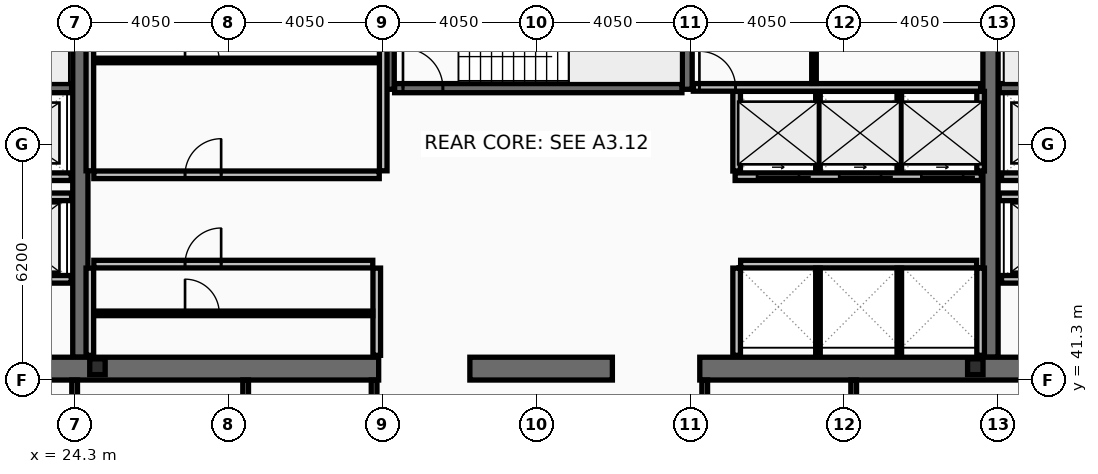
"""IFC4 building model, lengths in metres.
Left out: names, types, materials, properties, quantities, classifications, styles, units other than length and angle.
Written with IfcOpenShell. Run it as: python <this file> out.ifc"""

import sys

from ifc_helpers import new_model, si_unit, direction, frame, frame_2d, origin, origin_2d, place, context, subcontext, project, spatial, rectangle, i_section, extrude, element, fill, save


model = new_model("IFC4")
c1 = context("Model", 3, precision=1e-05, world=origin(), true_north=direction((0.0, 1.0)))
c2 = subcontext(c1, "Body", "Model", "MODEL_VIEW")
j1 = project(units=[si_unit("LENGTHUNIT", "METRE"), si_unit("PLANEANGLEUNIT", "RADIAN")], contexts=[c1])
p1 = place(None, origin())
s1 = spatial("IfcSite", under=j1, at=p1, CompositionType="ELEMENT")
p2 = place(p1, origin())
s2 = spatial("IfcBuilding", under=s1, at=p2, CompositionType="ELEMENT")
p3 = place(p2, frame((0.0, 0.0, 195.8)))
s3 = spatial("IfcBuildingStorey", under=s2, at=p3, CompositionType="ELEMENT", Elevation=195.8)
for number, where, z_axis, x_axis in (
    (1, (24.45, 41.9, 0.0), (0.0, 0.0, 1.0), (0.0, 1.0, 0.0)),
    (2, (48.4, 41.9, 0.0), (0.0, 0.0, 1.0), (0.0, 1.0, 0.0)),
):
    element("IfcWall", number, at=place(p3, frame(where, z_axis=z_axis, x_axis=x_axis)), inside=s3, PredefinedType="SHEAR", context=c2, shape_type="SweptSolid", body=[
        extrude(rectangle(XDim=11.2, YDim=0.4, at=frame_2d((5.6, 0.0))), origin(), (0.0, 0.0, 1.0), 3.44),
    ])
p4 = place(p3, frame((32.3, 41.6, 0.0), z_axis=(0.0, 0.0, 1.0), x_axis=(-1.0, 0.0, 0.0)))
e3 = element("IfcWall", 3, at=p4, inside=s3, PredefinedType="SHEAR", context=c2, shape_type="SweptSolid", body=[
    extrude(rectangle(XDim=11.45, YDim=0.6, at=frame_2d((5.725, 0.0))), origin(), (0.0, 0.0, 1.0), 3.44),
])
p5 = place(p3, frame((38.45, 41.6, 0.0), z_axis=(0.0, 0.0, 1.0), x_axis=(-1.0, 0.0, 0.0)))
e4 = element("IfcWall", 4, at=p5, inside=s3, PredefinedType="SHEAR", context=c2, shape_type="SweptSolid", body=[
    extrude(rectangle(XDim=3.75, YDim=0.6, at=frame_2d((1.875, 0.0))), origin(), (0.0, 0.0, 1.0), 3.44),
])
p6 = place(p3, frame((52.05, 41.6, 0.0), z_axis=(0.0, 0.0, 1.0), x_axis=(-1.0, 0.0, 0.0)))
e5 = element("IfcWall", 5, at=p6, inside=s3, PredefinedType="SHEAR", context=c2, shape_type="SweptSolid", body=[
    extrude(rectangle(XDim=11.3, YDim=0.6, at=frame_2d((5.65, 0.0))), origin(), (0.0, 0.0, 1.0), 3.44),
])
for number, where, z_axis, x_axis in (
    (6, (32.58, 48.95, 0.0), (0.0, 0.0, 1.0), (0.0, 1.0, 0.0)),
    (7, (40.42, 48.95, 0.0), (0.0, 0.0, 1.0), (0.0, 1.0, 0.0)),
):
    element("IfcWall", number, at=place(p3, frame(where, z_axis=z_axis, x_axis=x_axis)), inside=s3, PredefinedType="SHEAR", context=c2, shape_type="SweptSolid", body=[
        extrude(rectangle(XDim=4.15, YDim=0.26, at=frame_2d((2.075, 0.0))), origin(), (0.0, 0.0, 1.0), 3.44),
    ])
p7 = place(p3, frame((16.8, 48.98, 0.0), z_axis=(0.0, 0.0, 1.0), x_axis=(1.0, 0.0, 0.0)))
e8 = element("IfcWall", 8, at=p7, inside=s3, PredefinedType="SHEAR", context=c2, shape_type="SweptSolid", body=[
    extrude(rectangle(XDim=7.42, YDim=0.24, at=frame_2d((3.71, 0.0))), origin(), (0.0, 0.0, 1.0), 3.44),
])
p8 = place(p7, frame((0.22, 0.0, 0.0)))
e9 = element("IfcOpeningElement", 9, at=p8, cuts=e8, PredefinedType="OPENING", context=c2, shape_type="SweptSolid", body=[
    extrude(rectangle(XDim=1.05, YDim=2.15, at=frame_2d((0.525, 1.075))), frame((0.0, 0.13, 0.0), z_axis=(0.0, -1.0, 0.0), x_axis=(1.0, 0.0, 0.0)), (0.0, 0.0, 1.0), 0.26),
])
p9 = place(p3, frame((48.63, 48.98, 0.0), z_axis=(0.0, 0.0, 1.0), x_axis=(1.0, 0.0, 0.0)))
e10 = element("IfcWall", 10, at=p9, inside=s3, PredefinedType="SHEAR", context=c2, shape_type="SweptSolid", body=[
    extrude(rectangle(XDim=7.47, YDim=0.24, at=frame_2d((3.735, 0.0))), origin(), (0.0, 0.0, 1.0), 3.44),
])
p10 = place(p9, frame((6.2, 0.0, 0.0)))
e11 = element("IfcOpeningElement", 11, at=p10, cuts=e10, PredefinedType="OPENING", context=c2, shape_type="SweptSolid", body=[
    extrude(rectangle(XDim=1.05, YDim=2.15, at=frame_2d((0.525, 1.075))), frame((0.0, 0.13, 0.0), z_axis=(0.0, -1.0, 0.0), x_axis=(1.0, 0.0, 0.0)), (0.0, 0.0, 1.0), 0.26),
])
p11 = place(p3, frame((32.72, 48.98, 0.0), z_axis=(0.0, 0.0, 1.0), x_axis=(1.0, 0.0, 0.0)))
e12 = element("IfcWall", 12, at=p11, inside=s3, PredefinedType="SHEAR", context=c2, shape_type="SweptSolid", body=[
    extrude(rectangle(XDim=7.56, YDim=0.24, at=frame_2d((3.78, 0.0))), origin(), (0.0, 0.0, 1.0), 3.44),
])
p12 = place(p11, frame((0.22, 0.0, 0.0)))
e13 = element("IfcOpeningElement", 13, at=p12, cuts=e12, PredefinedType="OPENING", context=c2, shape_type="SweptSolid", body=[
    extrude(rectangle(XDim=1.05, YDim=2.15, at=frame_2d((0.525, 1.075))), frame((0.0, 0.13, 0.0), z_axis=(0.0, -1.0, 0.0), x_axis=(1.0, 0.0, 0.0)), (0.0, 0.0, 1.0), 0.26),
])
for number, where, z_axis, x_axis in (
    (14, (24.9, 41.65, 0.0), (0.0, 0.0, 1.0), (1.0, 0.0, 0.0)),
    (15, (48.0, 41.65, 0.0), (0.0, 0.0, 1.0), (1.0, 0.0, 0.0)),
):
    element("IfcColumn", number, at=place(p3, frame(where, z_axis=z_axis, x_axis=x_axis)), inside=s3, PredefinedType="COLUMN", context=c2, shape_type="SweptSolid", body=[
        extrude(i_section(OverallWidth=0.406, OverallDepth=0.416, WebThickness=0.03, FlangeThickness=0.048, at=origin_2d()), origin(), (0.0, 0.0, 1.0), 3.6),
    ])
p13 = place(p3, frame((51.61, 43.95, 0.0), z_axis=(0.0, 0.0, 1.0), x_axis=(-1.0, 0.0, 0.0)))
e16 = element("IfcWall", 16, at=p13, inside=s3, PredefinedType="PARTITIONING", context=c2, shape_type="SweptSolid", body=[
    extrude(rectangle(XDim=2.92, YDim=0.2, at=frame_2d((1.46, 0.0))), origin(), (0.0, 0.0, 1.0), 3.44),
])
p14 = place(p13, frame((0.81, 0.0, 0.0)))
e17 = element("IfcOpeningElement", 17, at=p14, cuts=e16, PredefinedType="OPENING", context=c2, shape_type="SweptSolid", body=[
    extrude(rectangle(XDim=1.3, YDim=2.18, at=frame_2d((0.65, 1.09))), frame((0.0, 0.11, 0.0), z_axis=(0.0, -1.0, 0.0), x_axis=(1.0, 0.0, 0.0)), (0.0, 0.0, 1.0), 0.22),
])
p15 = place(p3, frame((24.21, 43.95, 0.0), z_axis=(0.0, 0.0, 1.0), x_axis=(-1.0, 0.0, 0.0)))
e18 = element("IfcWall", 18, at=p15, inside=s3, PredefinedType="PARTITIONING", context=c2, shape_type="SweptSolid", body=[
    extrude(rectangle(XDim=2.97, YDim=0.2, at=frame_2d((1.485, 0.0))), origin(), (0.0, 0.0, 1.0), 3.44),
])
p16 = place(p15, frame((0.86, 0.0, 0.0)))
e19 = element("IfcOpeningElement", 19, at=p16, cuts=e18, PredefinedType="OPENING", context=c2, shape_type="SweptSolid", body=[
    extrude(rectangle(XDim=1.3, YDim=2.18, at=frame_2d((0.65, 1.09))), frame((0.0, 0.11, 0.0), z_axis=(0.0, -1.0, 0.0), x_axis=(1.0, 0.0, 0.0)), (0.0, 0.0, 1.0), 0.22),
])
p17 = place(p3, frame((51.61, 46.65, 0.0), z_axis=(0.0, 0.0, 1.0), x_axis=(-1.0, 0.0, 0.0)))
e20 = element("IfcWall", 20, at=p17, inside=s3, PredefinedType="PARTITIONING", context=c2, shape_type="SweptSolid", body=[
    extrude(rectangle(XDim=2.92, YDim=0.2, at=frame_2d((1.46, 0.0))), origin(), (0.0, 0.0, 1.0), 3.44),
])
p18 = place(p17, frame((0.86, 0.0, 0.0)))
e21 = element("IfcOpeningElement", 21, at=p18, cuts=e20, PredefinedType="OPENING", context=c2, shape_type="SweptSolid", body=[
    extrude(rectangle(XDim=1.2, YDim=2.18, at=frame_2d((0.6, 1.09))), frame((0.0, 0.11, 0.0), z_axis=(0.0, -1.0, 0.0), x_axis=(1.0, 0.0, 0.0)), (0.0, 0.0, 1.0), 0.22),
])
p19 = place(p3, frame((24.21, 46.65, 0.0), z_axis=(0.0, 0.0, 1.0), x_axis=(-1.0, 0.0, 0.0)))
e22 = element("IfcWall", 22, at=p19, inside=s3, PredefinedType="PARTITIONING", context=c2, shape_type="SweptSolid", body=[
    extrude(rectangle(XDim=2.97, YDim=0.2, at=frame_2d((1.485, 0.0))), origin(), (0.0, 0.0, 1.0), 3.44),
])
p20 = place(p19, frame((0.91, 0.0, 0.0)))
e23 = element("IfcOpeningElement", 23, at=p20, cuts=e22, PredefinedType="OPENING", context=c2, shape_type="SweptSolid", body=[
    extrude(rectangle(XDim=1.2, YDim=2.18, at=frame_2d((0.6, 1.09))), frame((0.0, 0.11, 0.0), z_axis=(0.0, -1.0, 0.0), x_axis=(1.0, 0.0, 0.0)), (0.0, 0.0, 1.0), 0.22),
])
p21 = place(p3, frame((48.16, 46.65, 0.0), z_axis=(0.0, 0.0, 1.0), x_axis=(-1.0, 0.0, 0.0)))
e24 = element("IfcWall", 24, at=p21, inside=s3, PredefinedType="PARTITIONING", context=c2, shape_type="SweptSolid", body=[
    extrude(rectangle(XDim=6.48, YDim=0.2, at=frame_2d((3.24, 0.0))), origin(), (0.0, 0.0, 1.0), 3.44),
])
p22 = place(p21, frame((4.8, 0.0, 0.0)))
e25 = element("IfcOpeningElement", 25, at=p22, cuts=e24, PredefinedType="OPENING", context=c2, shape_type="SweptSolid", body=[
    extrude(rectangle(XDim=1.1, YDim=2.18, at=frame_2d((0.55, 1.09))), frame((0.0, 0.11, 0.0), z_axis=(0.0, -1.0, 0.0), x_axis=(1.0, 0.0, 0.0)), (0.0, 0.0, 1.0), 0.22),
])
p23 = place(p21, frame((2.64, 0.0, 0.0)))
e26 = element("IfcOpeningElement", 26, at=p23, cuts=e24, PredefinedType="OPENING", context=c2, shape_type="SweptSolid", body=[
    extrude(rectangle(XDim=1.1, YDim=2.18, at=frame_2d((0.55, 1.09))), frame((0.0, 0.11, 0.0), z_axis=(0.0, -1.0, 0.0), x_axis=(1.0, 0.0, 0.0)), (0.0, 0.0, 1.0), 0.22),
])
p24 = place(p21, frame((0.48, 0.0, 0.0)))
e27 = element("IfcOpeningElement", 27, at=p24, cuts=e24, PredefinedType="OPENING", context=c2, shape_type="SweptSolid", body=[
    extrude(rectangle(XDim=1.1, YDim=2.18, at=frame_2d((0.55, 1.09))), frame((0.0, 0.11, 0.0), z_axis=(0.0, -1.0, 0.0), x_axis=(1.0, 0.0, 0.0)), (0.0, 0.0, 1.0), 0.22),
])
p25 = place(p3, frame((21.2, 46.12, 0.0), z_axis=(0.0, 0.0, 1.0), x_axis=(1.0, 0.0, 0.0)))
e28 = element("IfcWall", 28, at=p25, inside=s3, PredefinedType="PARTITIONING", context=c2, shape_type="SweptSolid", body=[
    extrude(rectangle(XDim=3.02, YDim=0.2, at=frame_2d((1.51, 0.0))), origin(), (0.0, 0.0, 1.0), 3.44),
])
p26 = place(p3, frame((48.63, 46.12, 0.0), z_axis=(0.0, 0.0, 1.0), x_axis=(1.0, 0.0, 0.0)))
e29 = element("IfcWall", 29, at=p26, inside=s3, PredefinedType="PARTITIONING", context=c2, shape_type="SweptSolid", body=[
    extrude(rectangle(XDim=3.07, YDim=0.2, at=frame_2d((1.535, 0.0))), origin(), (0.0, 0.0, 1.0), 3.44),
])
for number, where, z_axis, x_axis in (
    (30, (24.7, 46.805, 0.0), (0.0, 0.0, 1.0), (0.0, 1.0, 0.0)),
    (31, (32.42, 46.805, 0.0), (0.0, 0.0, 1.0), (0.0, 1.0, 0.0)),
):
    element("IfcWall", number, at=place(p3, frame(where, z_axis=z_axis, x_axis=x_axis)), inside=s3, PredefinedType="PARTITIONING", context=c2, shape_type="SweptSolid", body=[
        extrude(rectangle(XDim=5.99, YDim=0.2, at=frame_2d((2.995, 0.0))), origin(), (0.0, 0.0, 1.0), 3.44),
    ])
p27 = place(p3, frame((24.805, 49.709, 0.0), z_axis=(0.0, 0.0, 1.0), x_axis=(1.0, 0.0, 0.0)))
e32 = element("IfcWall", 32, at=p27, inside=s3, PredefinedType="PARTITIONING", context=c2, shape_type="SweptSolid", body=[
    extrude(rectangle(XDim=7.51, YDim=0.12, at=frame_2d((3.755, 0.0))), origin(), (0.0, 0.0, 1.0), 3.44),
])
p28 = place(p27, frame((2.4, 0.0, 0.0)))
e33 = element("IfcOpeningElement", 33, at=p28, cuts=e32, PredefinedType="OPENING", context=c2, shape_type="SweptSolid", body=[
    extrude(rectangle(XDim=0.9, YDim=2.05, at=frame_2d((0.45, 1.025))), frame((0.0, 0.07, 0.0), z_axis=(0.0, -1.0, 0.0), x_axis=(1.0, 0.0, 0.0)), (0.0, 0.0, 1.0), 0.14),
])
p29 = place(p3, frame((24.805, 46.7, 0.0), z_axis=(0.0, 0.0, 1.0), x_axis=(1.0, 0.0, 0.0)))
e34 = element("IfcWall", 34, at=p29, inside=s3, PredefinedType="PARTITIONING", context=c2, shape_type="SweptSolid", body=[
    extrude(rectangle(XDim=7.51, YDim=0.2, at=frame_2d((3.755, 0.0))), origin(), (0.0, 0.0, 1.0), 3.44),
])
p30 = place(p29, frame((2.4, 0.0, 0.0)))
e35 = element("IfcOpeningElement", 35, at=p30, cuts=e34, PredefinedType="OPENING", context=c2, shape_type="SweptSolid", body=[
    extrude(rectangle(XDim=0.95, YDim=2.1, at=frame_2d((0.475, 1.05))), frame((0.0, 0.11, 0.0), z_axis=(0.0, -1.0, 0.0), x_axis=(1.0, 0.0, 0.0)), (0.0, 0.0, 1.0), 0.22),
])
for number, where, z_axis, x_axis in (
    (36, (24.7, 41.95, 0.0), (0.0, 0.0, 1.0), (0.0, 1.0, 0.0)),
    (37, (32.25, 41.95, 0.0), (0.0, 0.0, 1.0), (0.0, 1.0, 0.0)),
):
    element("IfcWall", number, at=place(p3, frame(where, z_axis=z_axis, x_axis=x_axis)), inside=s3, PredefinedType="PARTITIONING", context=c2, shape_type="SweptSolid", body=[
        extrude(rectangle(XDim=2.295, YDim=0.2, at=frame_2d((1.147, 0.0))), origin(), (0.0, 0.0, 1.0), 3.44),
    ])
p31 = place(p3, frame((24.805, 43.054, 0.0), z_axis=(0.0, 0.0, 1.0), x_axis=(1.0, 0.0, 0.0)))
e38 = element("IfcWall", 38, at=p31, inside=s3, PredefinedType="PARTITIONING", context=c2, shape_type="SweptSolid", body=[
    extrude(rectangle(XDim=7.34, YDim=0.12, at=frame_2d((3.67, 0.0))), origin(), (0.0, 0.0, 1.0), 3.44),
])
p32 = place(p31, frame((2.4, 0.0, 0.0)))
e39 = element("IfcOpeningElement", 39, at=p32, cuts=e38, PredefinedType="OPENING", context=c2, shape_type="SweptSolid", body=[
    extrude(rectangle(XDim=0.9, YDim=2.05, at=frame_2d((0.45, 1.025))), frame((0.0, 0.07, 0.0), z_axis=(0.0, -1.0, 0.0), x_axis=(1.0, 0.0, 0.0)), (0.0, 0.0, 1.0), 0.14),
])
p33 = place(p3, frame((24.805, 44.35, 0.0), z_axis=(0.0, 0.0, 1.0), x_axis=(1.0, 0.0, 0.0)))
e40 = element("IfcWall", 40, at=p33, inside=s3, PredefinedType="PARTITIONING", context=c2, shape_type="SweptSolid", body=[
    extrude(rectangle(XDim=7.34, YDim=0.2, at=frame_2d((3.67, 0.0))), origin(), (0.0, 0.0, 1.0), 3.44),
])
p34 = place(p33, frame((2.4, 0.0, 0.0)))
e41 = element("IfcOpeningElement", 41, at=p34, cuts=e40, PredefinedType="OPENING", context=c2, shape_type="SweptSolid", body=[
    extrude(rectangle(XDim=0.95, YDim=2.1, at=frame_2d((0.475, 1.05))), frame((0.0, 0.11, 0.0), z_axis=(0.0, -1.0, 0.0), x_axis=(1.0, 0.0, 0.0)), (0.0, 0.0, 1.0), 0.22),
])
for number, where, z_axis, x_axis in (
    (42, (41.72, 46.8, 0.0), (0.0, 0.0, 1.0), (0.0, 1.0, 0.0)),
    (43, (48.14, 46.8, 0.0), (0.0, 0.0, 1.0), (0.0, 1.0, 0.0)),
):
    element("IfcWall", number, at=place(p3, frame(where, z_axis=z_axis, x_axis=x_axis)), inside=s3, PredefinedType="PARTITIONING", context=c2, shape_type="SweptSolid", body=[
        extrude(rectangle(XDim=2.095, YDim=0.2, at=frame_2d((1.047, 0.0))), origin(), (0.0, 0.0, 1.0), 3.44),
    ])
for number, where, z_axis, x_axis in (
    (44, (43.86, 46.8, 0.0), (0.0, 0.0, 1.0), (0.0, 1.0, 0.0)),
    (45, (46.0, 46.8, 0.0), (0.0, 0.0, 1.0), (0.0, 1.0, 0.0)),
):
    element("IfcWall", number, at=place(p3, frame(where, z_axis=z_axis, x_axis=x_axis)), inside=s3, PredefinedType="PARTITIONING", context=c2, shape_type="SweptSolid", body=[
        extrude(rectangle(XDim=2.095, YDim=0.12, at=frame_2d((1.047, 0.0))), origin(), (0.0, 0.0, 1.0), 3.44),
    ])
p35 = place(p3, frame((41.825, 44.35, 0.0), z_axis=(0.0, 0.0, 1.0), x_axis=(1.0, 0.0, 0.0)))
e46 = element("IfcWall", 46, at=p35, inside=s3, PredefinedType="PARTITIONING", context=c2, shape_type="SweptSolid", body=[
    extrude(rectangle(XDim=6.21, YDim=0.2, at=frame_2d((3.105, 0.0))), origin(), (0.0, 0.0, 1.0), 3.44),
])
for number, where, z_axis, x_axis in (
    (47, (41.72, 41.95, 0.0), (0.0, 0.0, 1.0), (0.0, 1.0, 0.0)),
    (48, (48.14, 41.95, 0.0), (0.0, 0.0, 1.0), (0.0, 1.0, 0.0)),
):
    element("IfcWall", number, at=place(p3, frame(where, z_axis=z_axis, x_axis=x_axis)), inside=s3, PredefinedType="PARTITIONING", context=c2, shape_type="SweptSolid", body=[
        extrude(rectangle(XDim=2.295, YDim=0.2, at=frame_2d((1.147, 0.0))), origin(), (0.0, 0.0, 1.0), 3.44),
    ])
for number, where, z_axis, x_axis in (
    (49, (43.86, 41.95, 0.0), (0.0, 0.0, 1.0), (0.0, 1.0, 0.0)),
    (50, (46.0, 41.95, 0.0), (0.0, 0.0, 1.0), (0.0, 1.0, 0.0)),
):
    element("IfcWall", number, at=place(p3, frame(where, z_axis=z_axis, x_axis=x_axis)), inside=s3, PredefinedType="PARTITIONING", context=c2, shape_type="SweptSolid", body=[
        extrude(rectangle(XDim=2.295, YDim=0.12, at=frame_2d((1.147, 0.0))), origin(), (0.0, 0.0, 1.0), 3.44),
    ])
p36 = place(p3, frame((40.58, 49.0, 0.0), z_axis=(0.0, 0.0, 1.0), x_axis=(1.0, 0.0, 0.0)))
e51 = element("IfcWall", 51, at=p36, inside=s3, PredefinedType="PARTITIONING", context=c2, shape_type="SweptSolid", body=[
    extrude(rectangle(XDim=7.56, YDim=0.2, at=frame_2d((3.78, 0.0))), origin(), (0.0, 0.0, 1.0), 3.44),
])
p37 = place(p36, frame((0.16, 0.0, 0.0)))
e52 = element("IfcOpeningElement", 52, at=p37, cuts=e51, PredefinedType="OPENING", context=c2, shape_type="SweptSolid", body=[
    extrude(rectangle(XDim=0.95, YDim=2.1, at=frame_2d((0.475, 1.05))), frame((0.0, 0.11, 0.0), z_axis=(0.0, -1.0, 0.0), x_axis=(1.0, 0.0, 0.0)), (0.0, 0.0, 1.0), 0.22),
])
p38 = place(p3, frame((43.755, 49.105, 0.0), z_axis=(0.0, 0.0, 1.0), x_axis=(0.0, 1.0, 0.0)))
e53 = element("IfcWall", 53, at=p38, inside=s3, PredefinedType="PARTITIONING", context=c2, shape_type="SweptSolid", body=[
    extrude(rectangle(XDim=3.69, YDim=0.12, at=frame_2d((1.845, 0.0))), origin(), (0.0, 0.0, 1.0), 3.44),
])
p39 = place(p38, frame((1.05, 0.0, 0.0)))
e54 = element("IfcOpeningElement", 54, at=p39, cuts=e53, PredefinedType="OPENING", context=c2, shape_type="SweptSolid", body=[
    extrude(rectangle(XDim=0.9, YDim=2.05, at=frame_2d((0.45, 1.025))), frame((0.0, 0.07, 0.0), z_axis=(0.0, -1.0, 0.0), x_axis=(1.0, 0.0, 0.0)), (0.0, 0.0, 1.0), 0.14),
])
for number, where, z_axis, x_axis in (
    (55, (24.3, 38.28, 0.0), (0.0, 0.0, 1.0), (0.0, 1.0, 0.0)),
    (56, (28.8, 38.28, 0.0), (0.0, 0.0, 1.0), (0.0, 1.0, 0.0)),
    (57, (32.18, 38.28, 0.0), (0.0, 0.0, 1.0), (0.0, 1.0, 0.0)),
    (58, (40.88, 38.28, 0.0), (0.0, 0.0, 1.0), (0.0, 1.0, 0.0)),
    (59, (44.8, 38.28, 0.0), (0.0, 0.0, 1.0), (0.0, 1.0, 0.0)),
):
    element("IfcWall", number, at=place(p3, frame(where, z_axis=z_axis, x_axis=x_axis)), inside=s3, PredefinedType="PARTITIONING", context=c2, shape_type="SweptSolid", body=[
        extrude(rectangle(XDim=3.02, YDim=0.15, at=frame_2d((1.51, 0.0))), origin(), (0.0, 0.0, 1.0), 3.44),
    ])
p40 = place(p12, origin())
e60 = element("IfcDoor", 60, at=p40, inside=s3, OperationType="SINGLE_SWING_LEFT", PredefinedType="DOOR", context=c2, shape_type="SweptSolid", body=[
    extrude(rectangle(XDim=1.05, YDim=2.15, at=frame_2d((0.525, 1.075))), frame((0.0, 0.025, 0.0), z_axis=(0.0, -1.0, 0.0), x_axis=(1.0, 0.0, 0.0)), (0.0, 0.0, 1.0), 0.05),
])
fill(e13, e60)
p41 = place(p22, origin())
e61 = element("IfcDoor", 61, at=p41, inside=s3, OperationType="SLIDING_TO_LEFT", PredefinedType="DOOR", context=c2, shape_type="SweptSolid", body=[
    extrude(rectangle(XDim=1.1, YDim=2.18, at=frame_2d((0.55, 1.09))), frame((0.0, 0.025, 0.0), z_axis=(0.0, -1.0, 0.0), x_axis=(1.0, 0.0, 0.0)), (0.0, 0.0, 1.0), 0.05),
])
fill(e25, e61)
p42 = place(p23, origin())
e62 = element("IfcDoor", 62, at=p42, inside=s3, OperationType="SLIDING_TO_LEFT", PredefinedType="DOOR", context=c2, shape_type="SweptSolid", body=[
    extrude(rectangle(XDim=1.1, YDim=2.18, at=frame_2d((0.55, 1.09))), frame((0.0, 0.025, 0.0), z_axis=(0.0, -1.0, 0.0), x_axis=(1.0, 0.0, 0.0)), (0.0, 0.0, 1.0), 0.05),
])
fill(e26, e62)
p43 = place(p24, origin())
e63 = element("IfcDoor", 63, at=p43, inside=s3, OperationType="SLIDING_TO_LEFT", PredefinedType="DOOR", context=c2, shape_type="SweptSolid", body=[
    extrude(rectangle(XDim=1.1, YDim=2.18, at=frame_2d((0.55, 1.09))), frame((0.0, 0.025, 0.0), z_axis=(0.0, -1.0, 0.0), x_axis=(1.0, 0.0, 0.0)), (0.0, 0.0, 1.0), 0.05),
])
fill(e27, e63)
p44 = place(p28, origin())
e64 = element("IfcDoor", 64, at=p44, inside=s3, OperationType="SINGLE_SWING_LEFT", PredefinedType="DOOR", context=c2, shape_type="SweptSolid", body=[
    extrude(rectangle(XDim=0.9, YDim=2.05, at=frame_2d((0.45, 1.025))), frame((0.0, 0.025, 0.0), z_axis=(0.0, -1.0, 0.0), x_axis=(1.0, 0.0, 0.0)), (0.0, 0.0, 1.0), 0.05),
])
fill(e33, e64)
p45 = place(p30, origin())
e65 = element("IfcDoor", 65, at=p45, inside=s3, OperationType="SINGLE_SWING_RIGHT", PredefinedType="DOOR", context=c2, shape_type="SweptSolid", body=[
    extrude(rectangle(XDim=0.95, YDim=2.1, at=frame_2d((0.475, 1.05))), frame((0.0, 0.025, 0.0), z_axis=(0.0, -1.0, 0.0), x_axis=(1.0, 0.0, 0.0)), (0.0, 0.0, 1.0), 0.05),
])
fill(e35, e65)
p46 = place(p32, origin())
e66 = element("IfcDoor", 66, at=p46, inside=s3, OperationType="SINGLE_SWING_LEFT", PredefinedType="DOOR", context=c2, shape_type="SweptSolid", body=[
    extrude(rectangle(XDim=0.9, YDim=2.05, at=frame_2d((0.45, 1.025))), frame((0.0, 0.025, 0.0), z_axis=(0.0, -1.0, 0.0), x_axis=(1.0, 0.0, 0.0)), (0.0, 0.0, 1.0), 0.05),
])
fill(e39, e66)
p47 = place(p34, origin())
e67 = element("IfcDoor", 67, at=p47, inside=s3, OperationType="SINGLE_SWING_RIGHT", PredefinedType="DOOR", context=c2, shape_type="SweptSolid", body=[
    extrude(rectangle(XDim=0.95, YDim=2.1, at=frame_2d((0.475, 1.05))), frame((0.0, 0.025, 0.0), z_axis=(0.0, -1.0, 0.0), x_axis=(1.0, 0.0, 0.0)), (0.0, 0.0, 1.0), 0.05),
])
fill(e41, e67)
p48 = place(p37, origin())
e68 = element("IfcDoor", 68, at=p48, inside=s3, OperationType="SINGLE_SWING_LEFT", PredefinedType="DOOR", context=c2, shape_type="SweptSolid", body=[
    extrude(rectangle(XDim=0.95, YDim=2.1, at=frame_2d((0.475, 1.05))), frame((0.0, 0.025, 0.0), z_axis=(0.0, -1.0, 0.0), x_axis=(1.0, 0.0, 0.0)), (0.0, 0.0, 1.0), 0.05),
])
fill(e52, e68)
save(model, sys.argv[1])
